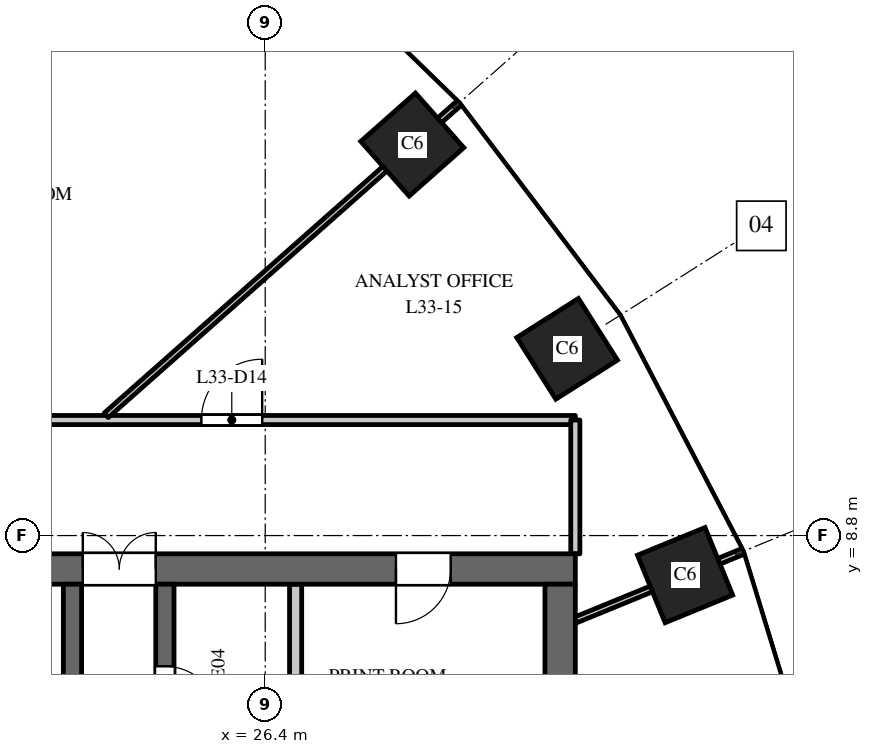
"""IFC4 building model, lengths in metres.
Left out: names, types, materials, properties, quantities, classifications, styles, units other than length and angle.
Written with IfcOpenShell. Run it as: python <this file> out.ifc"""

import sys

from ifc_helpers import new_model, si_unit, direction, frame, frame_2d, origin, origin_2d, place, context, subcontext, project, spatial, rectangle, extrude, element, fill, save


model = new_model("IFC4")
c1 = context("Model", 3, precision=1e-05, world=origin(), true_north=direction((0.0, 1.0)))
c2 = subcontext(c1, "Body", "Model", "MODEL_VIEW")
j1 = project(units=[si_unit("LENGTHUNIT", "METRE"), si_unit("PLANEANGLEUNIT", "RADIAN")], contexts=[c1])
p1 = place(None, origin())
s1 = spatial("IfcSite", under=j1, at=p1, CompositionType="ELEMENT")
p2 = place(p1, origin())
s2 = spatial("IfcBuilding", under=s1, at=p2, CompositionType="ELEMENT")
p3 = place(p2, frame((0.0, 0.0, 146.0)))
s3 = spatial("IfcBuildingStorey", under=s2, at=p3, CompositionType="ELEMENT", Elevation=146.0)
for number, where, z_axis, x_axis in (
    (1, (33.305, 8.149, 0.0), (0.0, 0.0, 1.0), (-0.379, 0.925, 0.0)),
    (2, (31.365, 11.871, 0.0), (0.0, 0.0, 1.0), (-0.535, 0.845, 0.0)),
    (3, (28.819, 15.23, 0.0), (0.0, 0.0, 1.0), (-0.663, 0.749, 0.0)),
):
    element("IfcColumn", number, at=place(p3, frame(where, z_axis=z_axis, x_axis=x_axis)), inside=s3, PredefinedType="COLUMN", context=c2, shape_type="SweptSolid", body=[
        extrude(rectangle(XDim=1.2, YDim=1.2, at=origin_2d()), origin(), (0.0, 0.0, 1.0), 4.0),
    ])
p4 = place(p3, frame((16.5, 8.25, 0.0), z_axis=(0.0, 0.0, 1.0), x_axis=(1.0, 0.0, 0.0)))
e4 = element("IfcWall", 4, at=p4, inside=s3, PredefinedType="SHEAR", context=c2, shape_type="SweptSolid", body=[
    extrude(rectangle(XDim=15.0, YDim=0.5, at=frame_2d((7.5, 0.0))), origin(), (0.0, 0.0, 1.0), 3.7),
])
p5 = place(p4, frame((6.9, 0.0, 0.0)))
e5 = element("IfcOpeningElement", 5, at=p5, cuts=e4, PredefinedType="OPENING", context=c2, shape_type="SweptSolid", body=[
    extrude(rectangle(XDim=1.2, YDim=2.1, at=frame_2d((0.6, 1.05))), frame((0.0, 0.26, 0.0), z_axis=(0.0, -1.0, 0.0), x_axis=(1.0, 0.0, 0.0)), (0.0, 0.0, 1.0), 0.52),
])
p6 = place(p4, frame((12.05, 0.0, 0.0)))
e6 = element("IfcOpeningElement", 6, at=p6, cuts=e4, PredefinedType="OPENING", context=c2, shape_type="SweptSolid", body=[
    extrude(rectangle(XDim=0.9, YDim=2.1, at=frame_2d((0.45, 1.05))), frame((0.0, 0.26, 0.0), z_axis=(0.0, -1.0, 0.0), x_axis=(1.0, 0.0, 0.0)), (0.0, 0.0, 1.0), 0.52),
])
p7 = place(p3, frame((24.75, -8.0, 0.0), z_axis=(0.0, 0.0, 1.0), x_axis=(0.0, 1.0, 0.0)))
e7 = element("IfcWall", 7, at=p7, inside=s3, PredefinedType="SHEAR", context=c2, shape_type="SweptSolid", body=[
    extrude(rectangle(XDim=16.0, YDim=0.3, at=frame_2d((8.0, 0.0))), origin(), (0.0, 0.0, 1.0), 3.7),
])
p8 = place(p7, frame((4.425, 0.0, 0.0)))
e8 = element("IfcOpeningElement", 8, at=p8, cuts=e7, PredefinedType="OPENING", context=c2, shape_type="SweptSolid", body=[
    extrude(rectangle(XDim=1.1, YDim=2.1, at=frame_2d((0.55, 1.05))), frame((0.0, 0.16, 0.0), z_axis=(0.0, -1.0, 0.0), x_axis=(1.0, 0.0, 0.0)), (0.0, 0.0, 1.0), 0.32),
])
p9 = place(p7, frame((7.45, 0.0, 0.0)))
e9 = element("IfcOpeningElement", 9, at=p9, cuts=e7, PredefinedType="OPENING", context=c2, shape_type="SweptSolid", body=[
    extrude(rectangle(XDim=1.1, YDim=2.1, at=frame_2d((0.55, 1.05))), frame((0.0, 0.16, 0.0), z_axis=(0.0, -1.0, 0.0), x_axis=(1.0, 0.0, 0.0)), (0.0, 0.0, 1.0), 0.32),
])
p10 = place(p7, frame((10.475, 0.0, 0.0)))
e10 = element("IfcOpeningElement", 10, at=p10, cuts=e7, PredefinedType="OPENING", context=c2, shape_type="SweptSolid", body=[
    extrude(rectangle(XDim=1.1, YDim=2.1, at=frame_2d((0.55, 1.05))), frame((0.0, 0.16, 0.0), z_axis=(0.0, -1.0, 0.0), x_axis=(1.0, 0.0, 0.0)), (0.0, 0.0, 1.0), 0.32),
])
p11 = place(p7, frame((13.75, 0.0, 0.0)))
e11 = element("IfcOpeningElement", 11, at=p11, cuts=e7, PredefinedType="OPENING", context=c2, shape_type="SweptSolid", body=[
    extrude(rectangle(XDim=0.9, YDim=2.1, at=frame_2d((0.45, 1.05))), frame((0.0, 0.16, 0.0), z_axis=(0.0, -1.0, 0.0), x_axis=(1.0, 0.0, 0.0)), (0.0, 0.0, 1.0), 0.32),
])
p12 = place(p7, frame((1.35, 0.0, 0.0)))
e12 = element("IfcOpeningElement", 12, at=p12, cuts=e7, PredefinedType="OPENING", context=c2, shape_type="SweptSolid", body=[
    extrude(rectangle(XDim=0.9, YDim=2.1, at=frame_2d((0.45, 1.05))), frame((0.0, 0.16, 0.0), z_axis=(0.0, -1.0, 0.0), x_axis=(1.0, 0.0, 0.0)), (0.0, 0.0, 1.0), 0.32),
])
p13 = place(p3, frame((31.25, -8.0, 0.0), z_axis=(0.0, 0.0, 1.0), x_axis=(0.0, 1.0, 0.0)))
e13 = element("IfcWall", 13, at=p13, inside=s3, PredefinedType="SHEAR", context=c2, shape_type="SweptSolid", body=[
    extrude(rectangle(XDim=16.0, YDim=0.5, at=frame_2d((8.0, 0.0))), origin(), (0.0, 0.0, 1.0), 3.7),
])
p14 = place(p3, frame((26.9, 4.75, 0.0), z_axis=(0.0, 0.0, 1.0), x_axis=(0.0, 1.0, 0.0)))
e14 = element("IfcWall", 14, at=p14, inside=s3, PredefinedType="PARTITIONING", context=c2, shape_type="SweptSolid", body=[
    extrude(rectangle(XDim=3.25, YDim=0.2, at=frame_2d((1.625, 0.0))), origin(), (0.0, 0.0, 1.0), 3.7),
])
p15 = place(p3, frame((23.23, 2.25, 0.0), z_axis=(0.0, 0.0, 1.0), x_axis=(0.0, 1.0, 0.0)))
e15 = element("IfcWall", 15, at=p15, inside=s3, PredefinedType="SHEAR", context=c2, shape_type="SweptSolid", body=[
    extrude(rectangle(XDim=5.75, YDim=0.3, at=frame_2d((2.875, 0.0))), origin(), (0.0, 0.0, 1.0), 3.7),
])
p16 = place(p15, frame((0.6, 0.0, 0.0)))
e16 = element("IfcOpeningElement", 16, at=p16, cuts=e15, PredefinedType="OPENING", context=c2, shape_type="SweptSolid", body=[
    extrude(rectangle(XDim=1.0, YDim=2.1, at=frame_2d((0.5, 1.05))), frame((0.0, 0.16, 0.0), z_axis=(0.0, -1.0, 0.0), x_axis=(1.0, 0.0, 0.0)), (0.0, 0.0, 1.0), 0.32),
])
p17 = place(p3, frame((16.5, 10.7, 0.0), z_axis=(0.0, 0.0, 1.0), x_axis=(1.0, 0.0, 0.0)))
e17 = element("IfcWall", 17, at=p17, inside=s3, PredefinedType="PARTITIONING", context=c2, shape_type="SweptSolid", body=[
    extrude(rectangle(XDim=15.0, YDim=0.15, at=frame_2d((7.5, 0.0))), origin(), (0.0, 0.0, 1.0), 2.75),
])
p18 = place(p17, frame((0.552, 0.0, 0.0)))
e18 = element("IfcOpeningElement", 18, at=p18, cuts=e17, PredefinedType="OPENING", context=c2, shape_type="SweptSolid", body=[
    extrude(rectangle(XDim=1.0, YDim=2.1, at=frame_2d((0.5, 1.05))), frame((0.0, 0.085, 0.0), z_axis=(0.0, -1.0, 0.0), x_axis=(1.0, 0.0, 0.0)), (0.0, 0.0, 1.0), 0.17),
])
p19 = place(p17, frame((8.85, 0.0, 0.0)))
e19 = element("IfcOpeningElement", 19, at=p19, cuts=e17, PredefinedType="OPENING", context=c2, shape_type="SweptSolid", body=[
    extrude(rectangle(XDim=1.0, YDim=2.1, at=frame_2d((0.5, 1.05))), frame((0.0, 0.085, 0.0), z_axis=(0.0, -1.0, 0.0), x_axis=(1.0, 0.0, 0.0)), (0.0, 0.0, 1.0), 0.17),
])
p20 = place(p3, frame((23.785, 10.778, 0.0), z_axis=(0.0, 0.0, 1.0), x_axis=(0.748985701008, 0.662586160198, 0.0)))
e20 = element("IfcWall", 20, at=p20, inside=s3, PredefinedType="PARTITIONING", context=c2, shape_type="SweptSolid", body=[
    extrude(rectangle(XDim=7.723, YDim=0.1, at=frame_2d((3.861, 0.0))), origin(), (0.0, 0.0, 1.0), 3.7),
])
p21 = place(p3, frame((31.5, 7.41, 0.0), z_axis=(0.0, 0.0, 1.0), x_axis=(0.925344112436, 0.379128307542, 0.0)))
e21 = element("IfcWall", 21, at=p21, inside=s3, PredefinedType="PARTITIONING", context=c2, shape_type="SweptSolid", body=[
    extrude(rectangle(XDim=2.954, YDim=0.1, at=frame_2d((1.477, 0.0))), origin(), (0.0, 0.0, 1.0), 3.7),
])
p22 = place(p3, frame((31.5, 8.5, 0.0), z_axis=(0.0, 0.0, 1.0), x_axis=(0.0, 1.0, 0.0)))
e22 = element("IfcWall", 22, at=p22, inside=s3, PredefinedType="PARTITIONING", context=c2, shape_type="SweptSolid", body=[
    extrude(rectangle(XDim=2.2, YDim=0.15, at=frame_2d((1.1, 0.0))), origin(), (0.0, 0.0, 1.0), 2.9),
])
p23 = place(p5, origin())
e23 = element("IfcDoor", 23, at=p23, inside=s3, OperationType="DOUBLE_DOOR_DOUBLE_SWING", PredefinedType="DOOR", context=c2, shape_type="SweptSolid", body=[
    extrude(rectangle(XDim=1.2, YDim=2.1, at=frame_2d((0.6, 1.05))), frame((0.0, 0.025, 0.0), z_axis=(0.0, -1.0, 0.0), x_axis=(1.0, 0.0, 0.0)), (0.0, 0.0, 1.0), 0.05),
])
fill(e5, e23)
p24 = place(p11, origin())
e24 = element("IfcDoor", 24, at=p24, inside=s3, OperationType="SINGLE_SWING_LEFT", PredefinedType="DOOR", context=c2, shape_type="SweptSolid", body=[
    extrude(rectangle(XDim=0.9, YDim=2.1, at=frame_2d((0.45, 1.05))), frame((0.0, 0.025, 0.0), z_axis=(0.0, -1.0, 0.0), x_axis=(1.0, 0.0, 0.0)), (0.0, 0.0, 1.0), 0.05),
])
fill(e11, e24)
p25 = place(p6, origin())
e25 = element("IfcDoor", 25, at=p25, inside=s3, OperationType="SINGLE_SWING_LEFT", PredefinedType="DOOR", context=c2, shape_type="SweptSolid", body=[
    extrude(rectangle(XDim=0.9, YDim=2.1, at=frame_2d((0.45, 1.05))), frame((0.0, 0.025, 0.0), z_axis=(0.0, -1.0, 0.0), x_axis=(1.0, 0.0, 0.0)), (0.0, 0.0, 1.0), 0.05),
])
fill(e6, e25)
p26 = place(p19, origin())
e26 = element("IfcDoor", 26, at=p26, inside=s3, OperationType="SINGLE_SWING_RIGHT", PredefinedType="DOOR", context=c2, shape_type="SweptSolid", body=[
    extrude(rectangle(XDim=1.0, YDim=2.1, at=frame_2d((0.5, 1.05))), frame((0.0, 0.025, 0.0), z_axis=(0.0, -1.0, 0.0), x_axis=(1.0, 0.0, 0.0)), (0.0, 0.0, 1.0), 0.05),
])
fill(e19, e26)
save(model, sys.argv[1])
